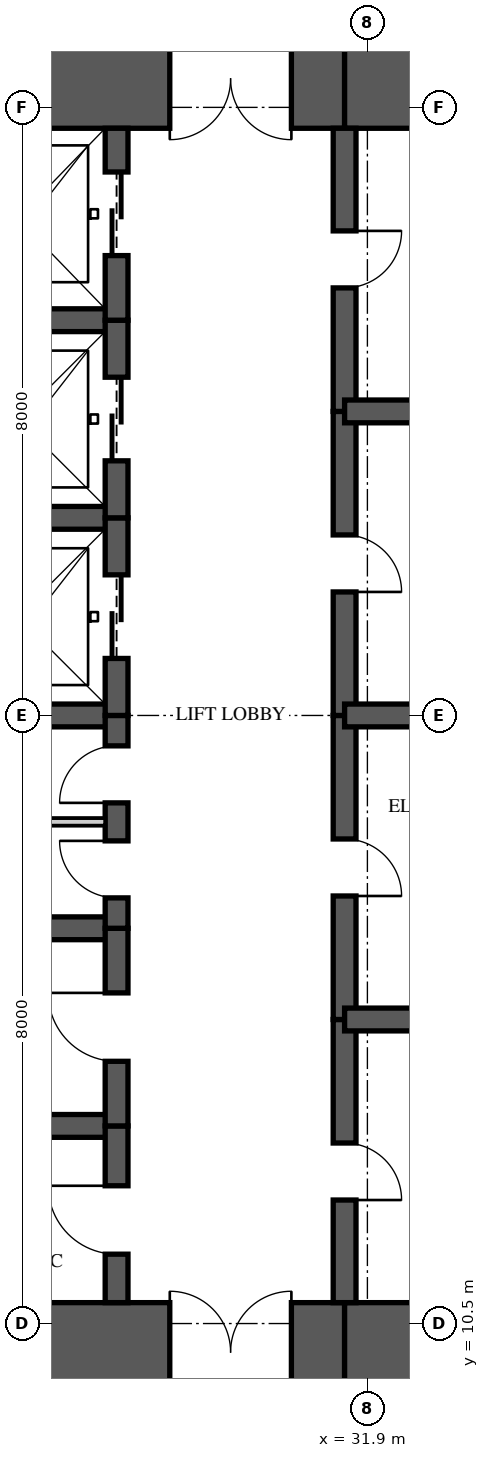
"""IFC4 building model, lengths in metres.
Left out: names, types, materials, properties, quantities, classifications, styles, units other than length and angle.
Written with IfcOpenShell. Run it as: python <this file> out.ifc"""

import sys

from ifc_helpers import new_model, si_unit, direction, frame, frame_2d, origin, place, context, subcontext, project, spatial, rectangle, extrude, element, fill, save


model = new_model("IFC4")
c1 = context("Model", 3, precision=1e-05, world=origin(), true_north=direction((0.0, 1.0)))
c2 = subcontext(c1, "Body", "Model", "MODEL_VIEW")
j1 = project(units=[si_unit("LENGTHUNIT", "METRE"), si_unit("PLANEANGLEUNIT", "RADIAN")], contexts=[c1])
p1 = place(None, origin())
s1 = spatial("IfcSite", under=j1, at=p1, CompositionType="ELEMENT")
p2 = place(p1, origin())
s2 = spatial("IfcBuilding", under=s1, at=p2, CompositionType="ELEMENT")
p3 = place(p2, frame((0.0, 0.0, 164.4)))
s3 = spatial("IfcBuildingStorey", under=s2, at=p3, CompositionType="ELEMENT", Elevation=164.4)
p4 = place(p3, frame((26.0, 10.125, 0.0), z_axis=(0.0, 0.0, 1.0), x_axis=(1.0, 0.0, 0.0)))
e1 = element("IfcWall", 1, at=p4, inside=s3, PredefinedType="SHEAR", context=c2, shape_type="SweptSolid", body=[
    extrude(rectangle(XDim=5.6, YDim=1.3, at=frame_2d((2.8, 0.0))), origin(), (0.0, 0.0, 1.0), 3.35),
])
p5 = place(p4, frame((3.3, 0.0, 0.0)))
e2 = element("IfcOpeningElement", 2, at=p5, cuts=e1, PredefinedType="OPENING", context=c2, shape_type="SweptSolid", body=[
    extrude(rectangle(XDim=1.6, YDim=2.1, at=frame_2d((0.8, 1.05))), frame((0.0, 0.66, 0.0), z_axis=(0.0, -1.0, 0.0), x_axis=(1.0, 0.0, 0.0)), (0.0, 0.0, 1.0), 1.32),
])
for number, where, z_axis, x_axis in (
    (3, (31.6, 10.125, 0.0), (0.0, 0.0, 1.0), (1.0, 0.0, 0.0)),
    (4, (35.9, 26.875, 0.0), (0.0, 0.0, 1.0), (-1.0, 0.0, 0.0)),
):
    element("IfcWall", number, at=place(p3, frame(where, z_axis=z_axis, x_axis=x_axis)), inside=s3, PredefinedType="SHEAR", context=c2, shape_type="SweptSolid", body=[
        extrude(rectangle(XDim=4.3, YDim=1.3, at=frame_2d((2.15, 0.0))), origin(), (0.0, 0.0, 1.0), 3.35),
    ])
p6 = place(p3, frame((31.6, 26.875, 0.0), z_axis=(0.0, 0.0, 1.0), x_axis=(-1.0, 0.0, 0.0)))
e5 = element("IfcWall", 5, at=p6, inside=s3, PredefinedType="SHEAR", context=c2, shape_type="SweptSolid", body=[
    extrude(rectangle(XDim=5.6, YDim=1.3, at=frame_2d((2.8, 0.0))), origin(), (0.0, 0.0, 1.0), 3.35),
])
p7 = place(p6, frame((0.7, 0.0, 0.0)))
e6 = element("IfcOpeningElement", 6, at=p7, cuts=e5, PredefinedType="OPENING", context=c2, shape_type="SweptSolid", body=[
    extrude(rectangle(XDim=1.6, YDim=2.1, at=frame_2d((0.8, 1.05))), frame((0.0, 0.66, 0.0), z_axis=(0.0, -1.0, 0.0), x_axis=(1.0, 0.0, 0.0)), (0.0, 0.0, 1.0), 1.32),
])
p8 = place(p3, frame((28.6, 10.775, 0.0), z_axis=(0.0, 0.0, 1.0), x_axis=(0.0, 1.0, 0.0)))
e7 = element("IfcWall", 7, at=p8, inside=s3, PredefinedType="SHEAR", context=c2, shape_type="SweptSolid", body=[
    extrude(rectangle(XDim=2.325, YDim=0.3, at=frame_2d((1.163, 0.0))), origin(), (0.0, 0.0, 1.0), 3.35),
])
p9 = place(p8, frame((0.637, 0.0, 0.0)))
e8 = element("IfcOpeningElement", 8, at=p9, cuts=e7, PredefinedType="OPENING", context=c2, shape_type="SweptSolid", body=[
    extrude(rectangle(XDim=0.9, YDim=2.1, at=frame_2d((0.45, 1.05))), frame((0.0, 0.16, 0.0), z_axis=(0.0, -1.0, 0.0), x_axis=(1.0, 0.0, 0.0)), (0.0, 0.0, 1.0), 0.32),
])
p10 = place(p3, frame((28.6, 13.1, 0.0), z_axis=(0.0, 0.0, 1.0), x_axis=(0.0, 1.0, 0.0)))
e9 = element("IfcWall", 9, at=p10, inside=s3, PredefinedType="SHEAR", context=c2, shape_type="SweptSolid", body=[
    extrude(rectangle(XDim=2.6, YDim=0.3, at=frame_2d((1.3, 0.0))), origin(), (0.0, 0.0, 1.0), 3.35),
])
p11 = place(p10, frame((0.85, 0.0, 0.0)))
e10 = element("IfcOpeningElement", 10, at=p11, cuts=e9, PredefinedType="OPENING", context=c2, shape_type="SweptSolid", body=[
    extrude(rectangle(XDim=0.9, YDim=2.1, at=frame_2d((0.45, 1.05))), frame((0.0, 0.16, 0.0), z_axis=(0.0, -1.0, 0.0), x_axis=(1.0, 0.0, 0.0)), (0.0, 0.0, 1.0), 0.32),
])
p12 = place(p3, frame((28.6, 15.7, 0.0), z_axis=(0.0, 0.0, 1.0), x_axis=(0.0, 1.0, 0.0)))
e11 = element("IfcWall", 11, at=p12, inside=s3, PredefinedType="SHEAR", context=c2, shape_type="SweptSolid", body=[
    extrude(rectangle(XDim=2.8, YDim=0.3, at=frame_2d((1.4, 0.0))), origin(), (0.0, 0.0, 1.0), 3.35),
])
p13 = place(p12, frame((0.4, 0.0, 0.0)))
e12 = element("IfcOpeningElement", 12, at=p13, cuts=e11, PredefinedType="OPENING", context=c2, shape_type="SweptSolid", body=[
    extrude(rectangle(XDim=0.75, YDim=2.1, at=frame_2d((0.375, 1.05))), frame((0.0, 0.16, 0.0), z_axis=(0.0, -1.0, 0.0), x_axis=(1.0, 0.0, 0.0)), (0.0, 0.0, 1.0), 0.32),
])
p14 = place(p12, frame((1.65, 0.0, 0.0)))
e13 = element("IfcOpeningElement", 13, at=p14, cuts=e11, PredefinedType="OPENING", context=c2, shape_type="SweptSolid", body=[
    extrude(rectangle(XDim=0.75, YDim=2.1, at=frame_2d((0.375, 1.05))), frame((0.0, 0.16, 0.0), z_axis=(0.0, -1.0, 0.0), x_axis=(1.0, 0.0, 0.0)), (0.0, 0.0, 1.0), 0.32),
])
p15 = place(p3, frame((28.6, 18.5, 0.0), z_axis=(0.0, 0.0, 1.0), x_axis=(0.0, 1.0, 0.0)))
e14 = element("IfcWall", 14, at=p15, inside=s3, PredefinedType="SHEAR", context=c2, shape_type="SweptSolid", body=[
    extrude(rectangle(XDim=2.6, YDim=0.3, at=frame_2d((1.3, 0.0))), origin(), (0.0, 0.0, 1.0), 3.35),
])
p16 = place(p15, frame((0.75, 0.0, 0.0)))
e15 = element("IfcOpeningElement", 15, at=p16, cuts=e14, PredefinedType="OPENING", context=c2, shape_type="SweptSolid", body=[
    extrude(rectangle(XDim=1.1, YDim=2.1, at=frame_2d((0.55, 1.05))), frame((0.0, 0.16, 0.0), z_axis=(0.0, -1.0, 0.0), x_axis=(1.0, 0.0, 0.0)), (0.0, 0.0, 1.0), 0.32),
])
p17 = place(p3, frame((28.6, 21.1, 0.0), z_axis=(0.0, 0.0, 1.0), x_axis=(0.0, 1.0, 0.0)))
e16 = element("IfcWall", 16, at=p17, inside=s3, PredefinedType="SHEAR", context=c2, shape_type="SweptSolid", body=[
    extrude(rectangle(XDim=2.6, YDim=0.3, at=frame_2d((1.3, 0.0))), origin(), (0.0, 0.0, 1.0), 3.35),
])
p18 = place(p17, frame((0.75, 0.0, 0.0)))
e17 = element("IfcOpeningElement", 17, at=p18, cuts=e16, PredefinedType="OPENING", context=c2, shape_type="SweptSolid", body=[
    extrude(rectangle(XDim=1.1, YDim=2.1, at=frame_2d((0.55, 1.05))), frame((0.0, 0.16, 0.0), z_axis=(0.0, -1.0, 0.0), x_axis=(1.0, 0.0, 0.0)), (0.0, 0.0, 1.0), 0.32),
])
p19 = place(p3, frame((28.6, 23.7, 0.0), z_axis=(0.0, 0.0, 1.0), x_axis=(0.0, 1.0, 0.0)))
e18 = element("IfcWall", 18, at=p19, inside=s3, PredefinedType="SHEAR", context=c2, shape_type="SweptSolid", body=[
    extrude(rectangle(XDim=2.525, YDim=0.3, at=frame_2d((1.263, 0.0))), origin(), (0.0, 0.0, 1.0), 3.35),
])
p20 = place(p19, frame((0.85, 0.0, 0.0)))
e19 = element("IfcOpeningElement", 19, at=p20, cuts=e18, PredefinedType="OPENING", context=c2, shape_type="SweptSolid", body=[
    extrude(rectangle(XDim=1.1, YDim=2.1, at=frame_2d((0.55, 1.05))), frame((0.0, 0.16, 0.0), z_axis=(0.0, -1.0, 0.0), x_axis=(1.0, 0.0, 0.0)), (0.0, 0.0, 1.0), 0.32),
])
p21 = place(p3, frame((31.6, 10.775, 0.0), z_axis=(0.0, 0.0, 1.0), x_axis=(0.0, 1.0, 0.0)))
e20 = element("IfcWall", 20, at=p21, inside=s3, PredefinedType="SHEAR", context=c2, shape_type="SweptSolid", body=[
    extrude(rectangle(XDim=3.725, YDim=0.3, at=frame_2d((1.863, 0.0))), origin(), (0.0, 0.0, 1.0), 3.35),
])
p22 = place(p21, frame((1.35, 0.0, 0.0)))
e21 = element("IfcOpeningElement", 21, at=p22, cuts=e20, PredefinedType="OPENING", context=c2, shape_type="SweptSolid", body=[
    extrude(rectangle(XDim=0.75, YDim=2.1, at=frame_2d((0.375, 1.05))), frame((0.0, 0.16, 0.0), z_axis=(0.0, -1.0, 0.0), x_axis=(1.0, 0.0, 0.0)), (0.0, 0.0, 1.0), 0.32),
])
p23 = place(p3, frame((31.6, 14.5, 0.0), z_axis=(0.0, 0.0, 1.0), x_axis=(0.0, 1.0, 0.0)))
e22 = element("IfcWall", 22, at=p23, inside=s3, PredefinedType="SHEAR", context=c2, shape_type="SweptSolid", body=[
    extrude(rectangle(XDim=4.0, YDim=0.3, at=frame_2d((2.0, 0.0))), origin(), (0.0, 0.0, 1.0), 3.35),
])
p24 = place(p23, frame((1.625, 0.0, 0.0)))
e23 = element("IfcOpeningElement", 23, at=p24, cuts=e22, PredefinedType="OPENING", context=c2, shape_type="SweptSolid", body=[
    extrude(rectangle(XDim=0.75, YDim=2.1, at=frame_2d((0.375, 1.05))), frame((0.0, 0.16, 0.0), z_axis=(0.0, -1.0, 0.0), x_axis=(1.0, 0.0, 0.0)), (0.0, 0.0, 1.0), 0.32),
])
p25 = place(p3, frame((31.6, 18.5, 0.0), z_axis=(0.0, 0.0, 1.0), x_axis=(0.0, 1.0, 0.0)))
e24 = element("IfcWall", 24, at=p25, inside=s3, PredefinedType="SHEAR", context=c2, shape_type="SweptSolid", body=[
    extrude(rectangle(XDim=4.0, YDim=0.3, at=frame_2d((2.0, 0.0))), origin(), (0.0, 0.0, 1.0), 3.35),
])
p26 = place(p25, frame((1.625, 0.0, 0.0)))
e25 = element("IfcOpeningElement", 25, at=p26, cuts=e24, PredefinedType="OPENING", context=c2, shape_type="SweptSolid", body=[
    extrude(rectangle(XDim=0.75, YDim=2.1, at=frame_2d((0.375, 1.05))), frame((0.0, 0.16, 0.0), z_axis=(0.0, -1.0, 0.0), x_axis=(1.0, 0.0, 0.0)), (0.0, 0.0, 1.0), 0.32),
])
p27 = place(p3, frame((31.6, 22.5, 0.0), z_axis=(0.0, 0.0, 1.0), x_axis=(0.0, 1.0, 0.0)))
e26 = element("IfcWall", 26, at=p27, inside=s3, PredefinedType="SHEAR", context=c2, shape_type="SweptSolid", body=[
    extrude(rectangle(XDim=3.725, YDim=0.3, at=frame_2d((1.863, 0.0))), origin(), (0.0, 0.0, 1.0), 3.35),
])
p28 = place(p27, frame((1.625, 0.0, 0.0)))
e27 = element("IfcOpeningElement", 27, at=p28, cuts=e26, PredefinedType="OPENING", context=c2, shape_type="SweptSolid", body=[
    extrude(rectangle(XDim=0.75, YDim=2.1, at=frame_2d((0.375, 1.05))), frame((0.0, 0.16, 0.0), z_axis=(0.0, -1.0, 0.0), x_axis=(1.0, 0.0, 0.0)), (0.0, 0.0, 1.0), 0.32),
])
for number, where, z_axis, x_axis in (
    (28, (26.0, 13.1, 0.0), (0.0, 0.0, 1.0), (1.0, 0.0, 0.0)),
    (29, (26.0, 15.7, 0.0), (0.0, 0.0, 1.0), (1.0, 0.0, 0.0)),
    (30, (26.0, 18.5, 0.0), (0.0, 0.0, 1.0), (1.0, 0.0, 0.0)),
    (31, (26.0, 21.1, 0.0), (0.0, 0.0, 1.0), (1.0, 0.0, 0.0)),
    (32, (26.0, 23.7, 0.0), (0.0, 0.0, 1.0), (1.0, 0.0, 0.0)),
):
    element("IfcWall", number, at=place(p3, frame(where, z_axis=z_axis, x_axis=x_axis)), inside=s3, PredefinedType="SHEAR", context=c2, shape_type="SweptSolid", body=[
        extrude(rectangle(XDim=2.6, YDim=0.3, at=frame_2d((1.3, 0.0))), origin(), (0.0, 0.0, 1.0), 3.35),
    ])
for number, where, z_axis, x_axis in (
    (33, (31.6, 14.5, 0.0), (0.0, 0.0, 1.0), (1.0, 0.0, 0.0)),
    (34, (31.6, 18.5, 0.0), (0.0, 0.0, 1.0), (1.0, 0.0, 0.0)),
    (35, (31.6, 22.5, 0.0), (0.0, 0.0, 1.0), (1.0, 0.0, 0.0)),
):
    element("IfcWall", number, at=place(p3, frame(where, z_axis=z_axis, x_axis=x_axis)), inside=s3, PredefinedType="SHEAR", context=c2, shape_type="SweptSolid", body=[
        extrude(rectangle(XDim=4.3, YDim=0.3, at=frame_2d((2.15, 0.0))), origin(), (0.0, 0.0, 1.0), 3.35),
    ])
p29 = place(p3, frame((26.15, 17.1, 0.0), z_axis=(0.0, 0.0, 1.0), x_axis=(1.0, 0.0, 0.0)))
e36 = element("IfcWall", 36, at=p29, inside=s3, PredefinedType="PARTITIONING", context=c2, shape_type="SweptSolid", body=[
    extrude(rectangle(XDim=2.3, YDim=0.1, at=frame_2d((1.15, 0.0))), origin(), (0.0, 0.0, 1.0), 3.11),
])
p30 = place(p16, origin())
e37 = element("IfcDoor", 37, at=p30, inside=s3, OperationType="SLIDING_TO_LEFT", PredefinedType="DOOR", context=c2, shape_type="SweptSolid", body=[
    extrude(rectangle(XDim=1.1, YDim=2.1, at=frame_2d((0.55, 1.05))), frame((0.0, 0.025, 0.0), z_axis=(0.0, -1.0, 0.0), x_axis=(1.0, 0.0, 0.0)), (0.0, 0.0, 1.0), 0.05),
])
fill(e15, e37)
p31 = place(p18, origin())
e38 = element("IfcDoor", 38, at=p31, inside=s3, OperationType="SLIDING_TO_LEFT", PredefinedType="DOOR", context=c2, shape_type="SweptSolid", body=[
    extrude(rectangle(XDim=1.1, YDim=2.1, at=frame_2d((0.55, 1.05))), frame((0.0, 0.025, 0.0), z_axis=(0.0, -1.0, 0.0), x_axis=(1.0, 0.0, 0.0)), (0.0, 0.0, 1.0), 0.05),
])
fill(e17, e38)
p32 = place(p20, origin())
e39 = element("IfcDoor", 39, at=p32, inside=s3, OperationType="SLIDING_TO_LEFT", PredefinedType="DOOR", context=c2, shape_type="SweptSolid", body=[
    extrude(rectangle(XDim=1.1, YDim=2.1, at=frame_2d((0.55, 1.05))), frame((0.0, 0.025, 0.0), z_axis=(0.0, -1.0, 0.0), x_axis=(1.0, 0.0, 0.0)), (0.0, 0.0, 1.0), 0.05),
])
fill(e19, e39)
p33 = place(p9, origin())
e40 = element("IfcDoor", 40, at=p33, inside=s3, OperationType="SINGLE_SWING_RIGHT", PredefinedType="DOOR", context=c2, shape_type="SweptSolid", body=[
    extrude(rectangle(XDim=0.9, YDim=2.1, at=frame_2d((0.45, 1.05))), frame((0.0, 0.025, 0.0), z_axis=(0.0, -1.0, 0.0), x_axis=(1.0, 0.0, 0.0)), (0.0, 0.0, 1.0), 0.05),
])
fill(e8, e40)
p34 = place(p11, origin())
e41 = element("IfcDoor", 41, at=p34, inside=s3, OperationType="SINGLE_SWING_RIGHT", PredefinedType="DOOR", context=c2, shape_type="SweptSolid", body=[
    extrude(rectangle(XDim=0.9, YDim=2.1, at=frame_2d((0.45, 1.05))), frame((0.0, 0.025, 0.0), z_axis=(0.0, -1.0, 0.0), x_axis=(1.0, 0.0, 0.0)), (0.0, 0.0, 1.0), 0.05),
])
fill(e10, e41)
p35 = place(p13, origin())
e42 = element("IfcDoor", 42, at=p35, inside=s3, OperationType="SINGLE_SWING_RIGHT", PredefinedType="DOOR", context=c2, shape_type="SweptSolid", body=[
    extrude(rectangle(XDim=0.75, YDim=2.1, at=frame_2d((0.375, 1.05))), frame((0.0, 0.025, 0.0), z_axis=(0.0, -1.0, 0.0), x_axis=(1.0, 0.0, 0.0)), (0.0, 0.0, 1.0), 0.05),
])
fill(e12, e42)
p36 = place(p14, origin())
e43 = element("IfcDoor", 43, at=p36, inside=s3, OperationType="SINGLE_SWING_LEFT", PredefinedType="DOOR", context=c2, shape_type="SweptSolid", body=[
    extrude(rectangle(XDim=0.75, YDim=2.1, at=frame_2d((0.375, 1.05))), frame((0.0, 0.025, 0.0), z_axis=(0.0, -1.0, 0.0), x_axis=(1.0, 0.0, 0.0)), (0.0, 0.0, 1.0), 0.05),
])
fill(e13, e43)
p37 = place(p5, origin())
e44 = element("IfcDoor", 44, at=p37, inside=s3, OperationType="DOUBLE_DOOR_SINGLE_SWING", PredefinedType="DOOR", context=c2, shape_type="SweptSolid", body=[
    extrude(rectangle(XDim=1.6, YDim=2.1, at=frame_2d((0.8, 1.05))), frame((0.0, 0.025, 0.0), z_axis=(0.0, -1.0, 0.0), x_axis=(1.0, 0.0, 0.0)), (0.0, 0.0, 1.0), 0.05),
])
fill(e2, e44)
p38 = place(p7, origin())
e45 = element("IfcDoor", 45, at=p38, inside=s3, OperationType="DOUBLE_DOOR_SINGLE_SWING", PredefinedType="DOOR", context=c2, shape_type="SweptSolid", body=[
    extrude(rectangle(XDim=1.6, YDim=2.1, at=frame_2d((0.8, 1.05))), frame((0.0, 0.025, 0.0), z_axis=(0.0, -1.0, 0.0), x_axis=(1.0, 0.0, 0.0)), (0.0, 0.0, 1.0), 0.05),
])
fill(e6, e45)
p39 = place(p22, frame((0.75, 0.0, 0.0), z_axis=(0.0, 0.0, 1.0), x_axis=(-1.0, 0.0, 0.0)))
e46 = element("IfcDoor", 46, at=p39, inside=s3, OperationType="SINGLE_SWING_RIGHT", PredefinedType="DOOR", context=c2, shape_type="SweptSolid", body=[
    extrude(rectangle(XDim=0.75, YDim=2.1, at=frame_2d((0.375, 1.05))), frame((0.0, 0.025, 0.0), z_axis=(0.0, -1.0, 0.0), x_axis=(1.0, 0.0, 0.0)), (0.0, 0.0, 1.0), 0.05),
])
fill(e21, e46)
p40 = place(p24, frame((0.75, 0.0, 0.0), z_axis=(0.0, 0.0, 1.0), x_axis=(-1.0, 0.0, 0.0)))
e47 = element("IfcDoor", 47, at=p40, inside=s3, OperationType="SINGLE_SWING_RIGHT", PredefinedType="DOOR", context=c2, shape_type="SweptSolid", body=[
    extrude(rectangle(XDim=0.75, YDim=2.1, at=frame_2d((0.375, 1.05))), frame((0.0, 0.025, 0.0), z_axis=(0.0, -1.0, 0.0), x_axis=(1.0, 0.0, 0.0)), (0.0, 0.0, 1.0), 0.05),
])
fill(e23, e47)
p41 = place(p26, frame((0.75, 0.0, 0.0), z_axis=(0.0, 0.0, 1.0), x_axis=(-1.0, 0.0, 0.0)))
e48 = element("IfcDoor", 48, at=p41, inside=s3, OperationType="SINGLE_SWING_RIGHT", PredefinedType="DOOR", context=c2, shape_type="SweptSolid", body=[
    extrude(rectangle(XDim=0.75, YDim=2.1, at=frame_2d((0.375, 1.05))), frame((0.0, 0.025, 0.0), z_axis=(0.0, -1.0, 0.0), x_axis=(1.0, 0.0, 0.0)), (0.0, 0.0, 1.0), 0.05),
])
fill(e25, e48)
p42 = place(p28, frame((0.75, 0.0, 0.0), z_axis=(0.0, 0.0, 1.0), x_axis=(-1.0, 0.0, 0.0)))
e49 = element("IfcDoor", 49, at=p42, inside=s3, OperationType="SINGLE_SWING_LEFT", PredefinedType="DOOR", context=c2, shape_type="SweptSolid", body=[
    extrude(rectangle(XDim=0.75, YDim=2.1, at=frame_2d((0.375, 1.05))), frame((0.0, 0.025, 0.0), z_axis=(0.0, -1.0, 0.0), x_axis=(1.0, 0.0, 0.0)), (0.0, 0.0, 1.0), 0.05),
])
fill(e27, e49)
save(model, sys.argv[1])
